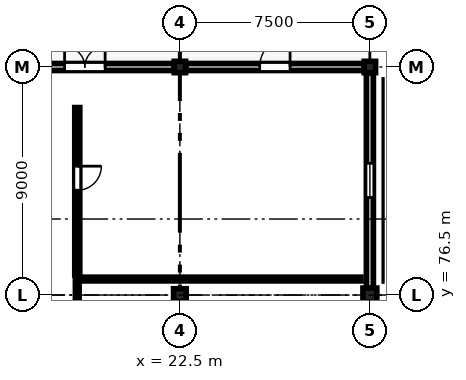
"""IFC4 building model, lengths in metres.
Left out: names, types, materials, properties, quantities, classifications, styles, units other than length and angle.
Written with IfcOpenShell. Run it as: python <this file> out.ifc"""

import sys

from ifc_helpers import new_model, si_unit, direction, frame, frame_2d, origin, origin_2d, place, context, subcontext, project, spatial, rectangle, extrude, element, fill, save


model = new_model("IFC4")
c1 = context("Model", 3, precision=1e-05, world=origin(), true_north=direction((0.0, 1.0)))
c2 = subcontext(c1, "Body", "Model", "MODEL_VIEW")
j1 = project(units=[si_unit("LENGTHUNIT", "METRE"), si_unit("PLANEANGLEUNIT", "RADIAN")], contexts=[c1])
p1 = place(None, origin())
s1 = spatial("IfcSite", under=j1, at=p1, CompositionType="ELEMENT")
p2 = place(p1, origin())
s2 = spatial("IfcBuilding", under=s1, at=p2, CompositionType="ELEMENT")
p3 = place(p2, frame((0.0, 0.0, 25.95)))
s3 = spatial("IfcBuildingStorey", under=s2, at=p3, CompositionType="ELEMENT", Elevation=25.95)
p4 = place(p3, frame((22.5, 76.5, 0.0), z_axis=(0.0, 0.0, 1.0), x_axis=(1.0, 0.0, 0.0)))
e1 = element("IfcColumn", 1, at=p4, inside=s3, PredefinedType="COLUMN", context=c2, shape_type="SweptSolid", body=[
    extrude(rectangle(XDim=0.5, YDim=0.5, at=origin_2d()), origin(), (0.0, 0.0, 1.0), 4.05),
])
p5 = place(p3, frame((22.5, 85.5, 0.0), z_axis=(0.0, 0.0, 1.0), x_axis=(1.0, 0.0, 0.0)))
e2 = element("IfcColumn", 2, at=p5, inside=s3, PredefinedType="COLUMN", context=c2, shape_type="SweptSolid", body=[
    extrude(rectangle(XDim=0.45, YDim=0.45, at=origin_2d()), origin(), (0.0, 0.0, 1.0), 4.05),
])
p6 = place(p3, frame((30.0, 76.5, 0.0), z_axis=(0.0, 0.0, 1.0), x_axis=(1.0, 0.0, 0.0)))
e3 = element("IfcColumn", 3, at=p6, inside=s3, PredefinedType="COLUMN", context=c2, shape_type="SweptSolid", body=[
    extrude(rectangle(XDim=0.55, YDim=0.55, at=origin_2d()), origin(), (0.0, 0.0, 1.0), 4.05),
])
p7 = place(p3, frame((30.0, 85.5, 0.0), z_axis=(0.0, 0.0, 1.0), x_axis=(1.0, 0.0, 0.0)))
e4 = element("IfcColumn", 4, at=p7, inside=s3, PredefinedType="COLUMN", context=c2, shape_type="SweptSolid", body=[
    extrude(rectangle(XDim=0.45, YDim=0.45, at=origin_2d()), origin(), (0.0, 0.0, 1.0), 4.05),
])
p8 = place(p3, frame((15.235, 85.5, 0.0), z_axis=(0.0, 0.0, 1.0), x_axis=(1.0, 0.0, 0.0)))
e5 = element("IfcWall", 5, at=p8, inside=s3, PredefinedType="STANDARD", context=c2, shape_type="SweptSolid", body=[
    extrude(rectangle(XDim=7.03, YDim=0.28, at=frame_2d((3.515, 0.0))), origin(), (0.0, 0.0, 1.0), 3.17),
])
p9 = place(p8, frame((2.715, 0.0, 0.0)))
e6 = element("IfcOpeningElement", 6, at=p9, cuts=e5, PredefinedType="OPENING", context=c2, shape_type="SweptSolid", body=[
    extrude(rectangle(XDim=1.6, YDim=2.35, at=frame_2d((0.8, 1.175))), frame((0.0, 0.15, 0.0), z_axis=(0.0, -1.0, 0.0), x_axis=(1.0, 0.0, 0.0)), (0.0, 0.0, 1.0), 0.3),
])
p10 = place(p3, frame((22.735, 85.5, 0.0), z_axis=(0.0, 0.0, 1.0), x_axis=(1.0, 0.0, 0.0)))
e7 = element("IfcWall", 7, at=p10, inside=s3, PredefinedType="STANDARD", context=c2, shape_type="SweptSolid", body=[
    extrude(rectangle(XDim=7.03, YDim=0.28, at=frame_2d((3.515, 0.0))), origin(), (0.0, 0.0, 1.0), 3.17),
])
p11 = place(p10, frame((2.915, 0.0, 0.0)))
e8 = element("IfcOpeningElement", 8, at=p11, cuts=e7, PredefinedType="OPENING", context=c2, shape_type="SweptSolid", body=[
    extrude(rectangle(XDim=1.2, YDim=2.3, at=frame_2d((0.6, 1.15))), frame((0.0, 0.15, 0.0), z_axis=(0.0, -1.0, 0.0), x_axis=(1.0, 0.0, 0.0)), (0.0, 0.0, 1.0), 0.3),
])
p12 = place(p3, frame((30.0, 85.265, 0.0), z_axis=(0.0, 0.0, 1.0), x_axis=(0.0, -1.0, 0.0)))
e9 = element("IfcWall", 9, at=p12, inside=s3, PredefinedType="STANDARD", context=c2, shape_type="SweptSolid", body=[
    extrude(rectangle(XDim=8.48, YDim=0.28, at=frame_2d((4.24, 0.0))), origin(), (0.0, 0.0, 1.0), 3.22),
])
p13 = place(p12, frame((3.565, 0.0, 0.85)))
e10 = element("IfcOpeningElement", 10, at=p13, cuts=e9, PredefinedType="OPENING", context=c2, shape_type="SweptSolid", body=[
    extrude(rectangle(XDim=1.35, YDim=2.09, at=frame_2d((0.675, 1.045))), frame((0.0, 0.15, 0.0), z_axis=(0.0, -1.0, 0.0), x_axis=(1.0, 0.0, 0.0)), (0.0, 0.0, 1.0), 0.3),
])
p14 = place(p3, frame((18.45, 77.131, 0.0), z_axis=(0.0, 0.0, 1.0), x_axis=(0.0, -1.0, 0.0)))
e11 = element("IfcWall", 11, at=p14, inside=s3, PredefinedType="PARTITIONING", context=c2, shape_type="SweptSolid", body=[
    extrude(rectangle(XDim=7.779, YDim=0.15, at=frame_2d((3.889, 0.0))), origin(), (0.0, 0.0, 1.0), 3.355),
])
p15 = place(p14, frame((3.807, 0.0, 0.0)))
e12 = element("IfcOpeningElement", 12, at=p15, cuts=e11, PredefinedType="OPENING", context=c2, shape_type="SweptSolid", body=[
    extrude(rectangle(XDim=1.35, YDim=2.25, at=frame_2d((0.675, 1.125))), frame((0.0, 0.085, 0.0), z_axis=(0.0, -1.0, 0.0), x_axis=(1.0, 0.0, 0.0)), (0.0, 0.0, 1.0), 0.17),
])
p16 = place(p3, frame((18.45, 83.9, 0.0), z_axis=(0.0, 0.0, 1.0), x_axis=(0.0, -1.0, 0.0)))
e13 = element("IfcWall", 13, at=p16, inside=s3, PredefinedType="STANDARD", context=c2, shape_type="SweptSolid", body=[
    extrude(rectangle(XDim=6.609, YDim=0.2, at=frame_2d((3.304, 0.0))), origin(), (0.0, 0.0, 1.0), 3.355),
])
p17 = place(p16, frame((2.314, 0.0, 0.0)))
e14 = element("IfcOpeningElement", 14, at=p17, cuts=e13, PredefinedType="OPENING", context=c2, shape_type="SweptSolid", body=[
    extrude(rectangle(XDim=0.95, YDim=2.15, at=frame_2d((0.475, 1.075))), frame((0.0, 0.11, 0.0), z_axis=(0.0, -1.0, 0.0), x_axis=(1.0, 0.0, 0.0)), (0.0, 0.0, 1.0), 0.22),
])
p18 = place(p3, frame((18.45, 77.131, 0.0), z_axis=(0.0, 0.0, 1.0), x_axis=(1.0, 0.0, 0.0)))
e15 = element("IfcWall", 15, at=p18, inside=s3, PredefinedType="PARTITIONING", context=c2, shape_type="SweptSolid", body=[
    extrude(rectangle(XDim=11.2, YDim=0.15, at=frame_2d((5.6, 0.0))), origin(), (0.0, 0.0, 1.0), 3.755),
])
p19 = place(p9, origin())
e16 = element("IfcDoor", 16, at=p19, inside=s3, OperationType="DOUBLE_DOOR_SINGLE_SWING", PredefinedType="DOOR", context=c2, shape_type="SweptSolid", body=[
    extrude(rectangle(XDim=1.6, YDim=2.35, at=frame_2d((0.8, 1.175))), frame((0.0, 0.025, 0.0), z_axis=(0.0, -1.0, 0.0), x_axis=(1.0, 0.0, 0.0)), (0.0, 0.0, 1.0), 0.05),
])
fill(e6, e16)
p20 = place(p11, origin())
e17 = element("IfcDoor", 17, at=p20, inside=s3, OperationType="SINGLE_SWING_RIGHT", PredefinedType="DOOR", context=c2, shape_type="SweptSolid", body=[
    extrude(rectangle(XDim=1.2, YDim=2.3, at=frame_2d((0.6, 1.15))), frame((0.0, 0.025, 0.0), z_axis=(0.0, -1.0, 0.0), x_axis=(1.0, 0.0, 0.0)), (0.0, 0.0, 1.0), 0.05),
])
fill(e8, e17)
p21 = place(p13, origin())
e18 = element("IfcWindow", 18, at=p21, inside=s3, PartitioningType="SINGLE_PANEL", PredefinedType="WINDOW", context=c2, shape_type="SweptSolid", body=[
    extrude(rectangle(XDim=1.35, YDim=2.09, at=frame_2d((0.675, 1.045))), frame((0.0, 0.03, 0.0), z_axis=(0.0, -1.0, 0.0), x_axis=(1.0, 0.0, 0.0)), (0.0, 0.0, 1.0), 0.06),
])
fill(e10, e18)
p22 = place(p17, origin())
e19 = element("IfcDoor", 19, at=p22, inside=s3, OperationType="SINGLE_SWING_LEFT", PredefinedType="DOOR", context=c2, shape_type="SweptSolid", body=[
    extrude(rectangle(XDim=0.95, YDim=2.15, at=frame_2d((0.475, 1.075))), frame((0.0, 0.025, 0.0), z_axis=(0.0, -1.0, 0.0), x_axis=(1.0, 0.0, 0.0)), (0.0, 0.0, 1.0), 0.05),
])
fill(e14, e19)
save(model, sys.argv[1])
